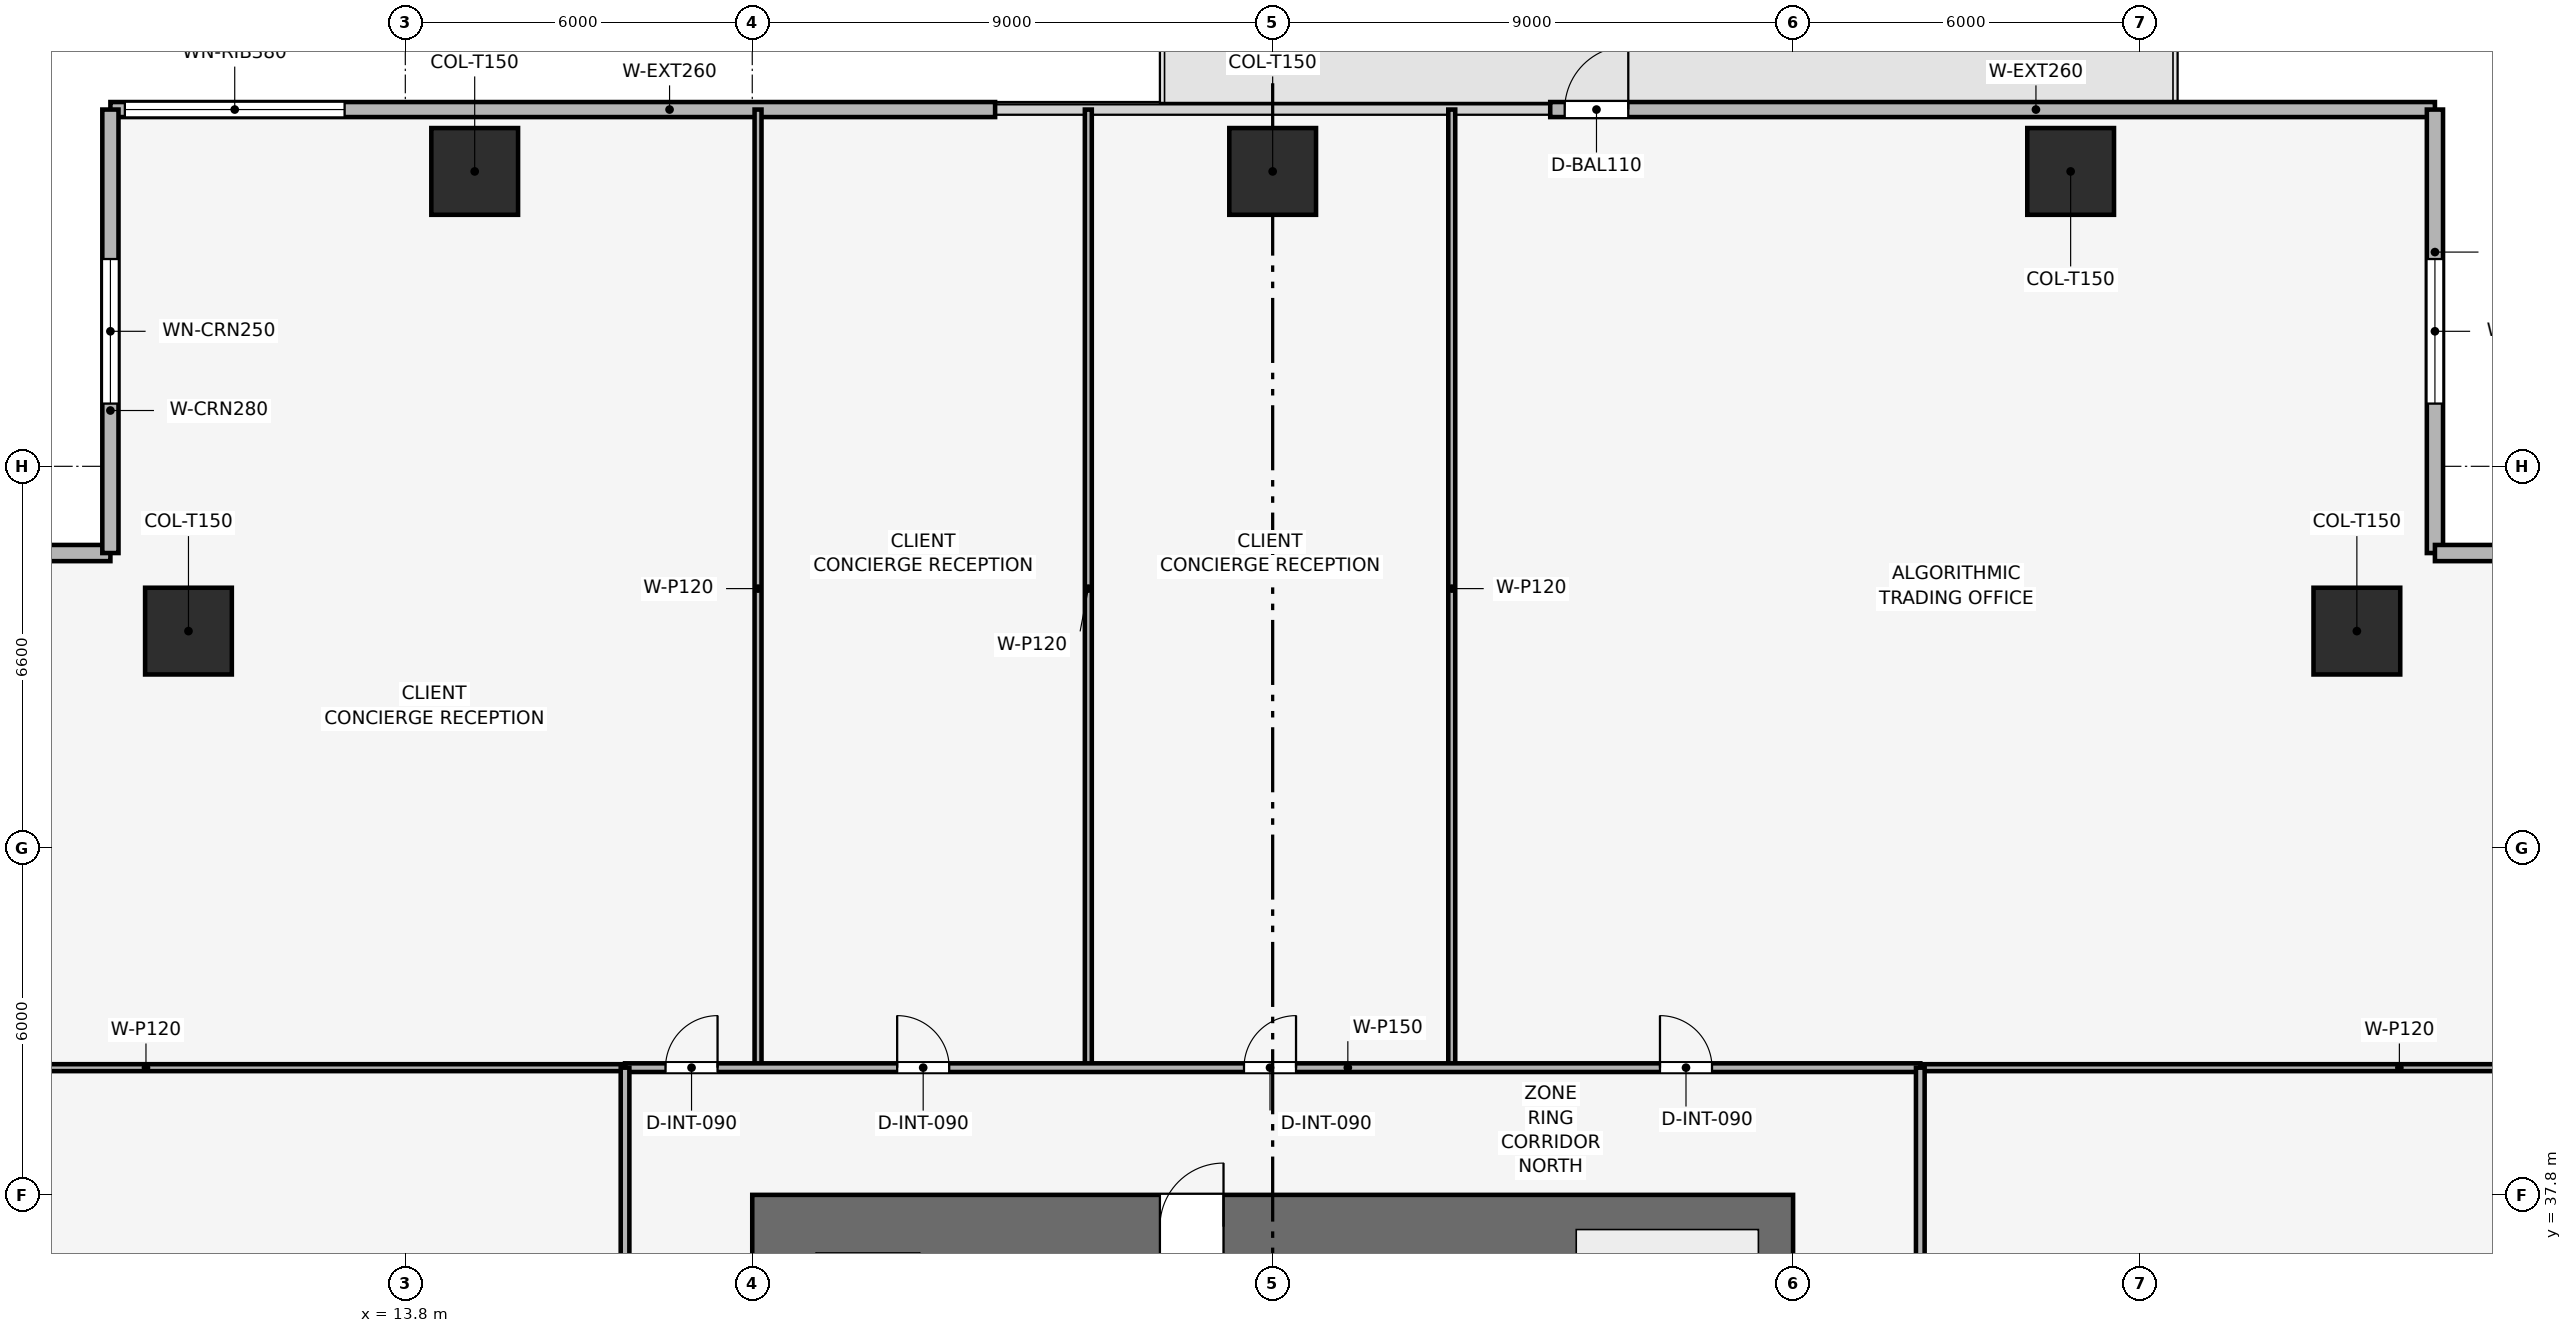
"""IFC4 building model, lengths in metres.
Left out: names, types, materials, properties, quantities, classifications, styles, units other than length and angle.
Written with IfcOpenShell. Run it as: python <this file> out.ifc"""

import sys

from ifc_helpers import new_model, si_unit, direction, frame, frame_2d, origin, origin_2d, place, context, subcontext, project, spatial, rectangle, extrude, element, fill, save


model = new_model("IFC4")
c1 = context("Model", 3, precision=1e-05, world=origin(), true_north=direction((0.0, 1.0)))
c2 = subcontext(c1, "Body", "Model", "MODEL_VIEW")
j1 = project(units=[si_unit("LENGTHUNIT", "METRE"), si_unit("PLANEANGLEUNIT", "RADIAN")], contexts=[c1])
p1 = place(None, origin())
s1 = spatial("IfcSite", under=j1, at=p1, CompositionType="ELEMENT")
p2 = place(p1, origin())
s2 = spatial("IfcBuilding", under=s1, at=p2, CompositionType="ELEMENT")
p3 = place(p2, frame((0.0, 0.0, 100.2)))
s3 = spatial("IfcBuildingStorey", under=s2, at=p3, CompositionType="ELEMENT", Elevation=100.2)
p4 = place(p3, frame((19.8, 37.25, 0.0), z_axis=(0.0, 0.0, 1.0), x_axis=(1.0, 0.0, 0.0)))
e1 = element("IfcWall", 1, at=p4, inside=s3, PredefinedType="SHEAR", context=c2, shape_type="SweptSolid", body=[
    extrude(rectangle(XDim=18.0, YDim=1.1, at=frame_2d((9.0, 0.0))), origin(), (0.0, 0.0, 1.0), 3.9),
])
p5 = place(p4, frame((7.05, 0.0, 0.0)))
e2 = element("IfcOpeningElement", 2, at=p5, cuts=e1, PredefinedType="OPENING", context=c2, shape_type="SweptSolid", body=[
    extrude(rectangle(XDim=1.1, YDim=2.15, at=frame_2d((0.55, 1.075))), frame((0.0, 0.56, 0.0), z_axis=(0.0, -1.0, 0.0), x_axis=(1.0, 0.0, 0.0)), (0.0, 0.0, 1.0), 1.12),
])
for number, where, z_axis, x_axis in (
    (3, (42.6, 55.5, 0.003), (0.0, 0.0, 1.0), (1.0, 0.0, 0.0)),
    (4, (28.8, 55.5, 0.003), (0.0, 0.0, 1.0), (1.0, 0.0, 0.0)),
    (5, (15.0, 55.5, 0.003), (0.0, 0.0, 1.0), (1.0, 0.0, 0.0)),
    (6, (47.55, 47.55, 0.003), (0.0, 0.0, 1.0), (1.0, 0.0, 0.0)),
    (7, (10.05, 47.55, 0.003), (0.0, 0.0, 1.0), (1.0, 0.0, 0.0)),
):
    element("IfcColumn", number, at=place(p3, frame(where, z_axis=z_axis, x_axis=x_axis)), inside=s3, PredefinedType="COLUMN", context=c2, shape_type="SweptSolid", body=[
        extrude(rectangle(XDim=1.5, YDim=1.5, at=origin_2d()), origin(), (0.0, 0.0, 1.0), 3.644),
    ])
p6 = place(p3, frame((8.7, 56.57, 0.0), z_axis=(0.0, 0.0, 1.0), x_axis=(1.0, 0.0, 0.0)))
e8 = element("IfcWall", 8, at=p6, inside=s3, PredefinedType="SOLIDWALL", context=c2, shape_type="SweptSolid", body=[
    extrude(rectangle(XDim=15.3, YDim=0.26, at=frame_2d((7.65, 0.0))), origin(), (0.0, 0.0, 1.0), 3.65),
])
p7 = place(p6, frame((0.25, 0.0, 0.9)))
e9 = element("IfcOpeningElement", 9, at=p7, cuts=e8, PredefinedType="OPENING", context=c2, shape_type="SweptSolid", body=[
    extrude(rectangle(XDim=3.8, YDim=1.9, at=frame_2d((1.9, 0.95))), frame((0.0, 0.14, 0.0), z_axis=(0.0, -1.0, 0.0), x_axis=(1.0, 0.0, 0.0)), (0.0, 0.0, 1.0), 0.28),
])
p8 = place(p3, frame((33.6, 56.57, 0.0), z_axis=(0.0, 0.0, 1.0), x_axis=(1.0, 0.0, 0.0)))
e10 = element("IfcWall", 10, at=p8, inside=s3, PredefinedType="SOLIDWALL", context=c2, shape_type="SweptSolid", body=[
    extrude(rectangle(XDim=15.3, YDim=0.26, at=frame_2d((7.65, 0.0))), origin(), (0.0, 0.0, 1.0), 3.65),
])
p9 = place(p8, frame((0.25, 0.0, 0.0)))
e11 = element("IfcOpeningElement", 11, at=p9, cuts=e10, PredefinedType="OPENING", context=c2, shape_type="SweptSolid", body=[
    extrude(rectangle(XDim=1.1, YDim=2.2, at=frame_2d((0.55, 1.1))), frame((0.0, 0.14, 0.0), z_axis=(0.0, -1.0, 0.0), x_axis=(1.0, 0.0, 0.0)), (0.0, 0.0, 1.0), 0.28),
])
p10 = place(p3, frame((1.03, 48.9, 0.0), z_axis=(0.0, 0.0, 1.0), x_axis=(1.0, 0.0, 0.0)))
e12 = element("IfcWall", 12, at=p10, inside=s3, PredefinedType="SOLIDWALL", context=c2, shape_type="SweptSolid", body=[
    extrude(rectangle(XDim=7.67, YDim=0.28, at=frame_2d((3.835, 0.0))), origin(), (0.0, 0.0, 1.0), 3.65),
])
p11 = place(p10, frame((2.585, 0.0, 0.9)))
e13 = element("IfcOpeningElement", 13, at=p11, cuts=e12, PredefinedType="OPENING", context=c2, shape_type="SweptSolid", body=[
    extrude(rectangle(XDim=2.5, YDim=1.9, at=frame_2d((1.25, 0.95))), frame((0.0, 0.15, 0.0), z_axis=(0.0, -1.0, 0.0), x_axis=(1.0, 0.0, 0.0)), (0.0, 0.0, 1.0), 0.3),
])
p12 = place(p3, frame((8.7, 48.9, 0.0), z_axis=(0.0, 0.0, 1.0), x_axis=(0.0, 1.0, 0.0)))
e14 = element("IfcWall", 14, at=p12, inside=s3, PredefinedType="SOLIDWALL", context=c2, shape_type="SweptSolid", body=[
    extrude(rectangle(XDim=7.67, YDim=0.28, at=frame_2d((3.835, 0.0))), origin(), (0.0, 0.0, 1.0), 3.65),
])
p13 = place(p12, frame((2.585, 0.0, 0.9)))
e15 = element("IfcOpeningElement", 15, at=p13, cuts=e14, PredefinedType="OPENING", context=c2, shape_type="SweptSolid", body=[
    extrude(rectangle(XDim=2.5, YDim=1.9, at=frame_2d((1.25, 0.95))), frame((0.0, 0.15, 0.0), z_axis=(0.0, -1.0, 0.0), x_axis=(1.0, 0.0, 0.0)), (0.0, 0.0, 1.0), 0.3),
])
p14 = place(p3, frame((48.9, 56.57, 0.0), z_axis=(0.0, 0.0, 1.0), x_axis=(0.0, -1.0, 0.0)))
e16 = element("IfcWall", 16, at=p14, inside=s3, PredefinedType="SOLIDWALL", context=c2, shape_type="SweptSolid", body=[
    extrude(rectangle(XDim=7.67, YDim=0.28, at=frame_2d((3.835, 0.0))), origin(), (0.0, 0.0, 1.0), 3.65),
])
p15 = place(p14, frame((2.585, 0.0, 0.9)))
e17 = element("IfcOpeningElement", 17, at=p15, cuts=e16, PredefinedType="OPENING", context=c2, shape_type="SweptSolid", body=[
    extrude(rectangle(XDim=2.5, YDim=1.9, at=frame_2d((1.25, 0.95))), frame((0.0, 0.15, 0.0), z_axis=(0.0, -1.0, 0.0), x_axis=(1.0, 0.0, 0.0)), (0.0, 0.0, 1.0), 0.3),
])
p16 = place(p3, frame((48.9, 48.9, 0.0), z_axis=(0.0, 0.0, 1.0), x_axis=(1.0, 0.0, 0.0)))
e18 = element("IfcWall", 18, at=p16, inside=s3, PredefinedType="SOLIDWALL", context=c2, shape_type="SweptSolid", body=[
    extrude(rectangle(XDim=7.67, YDim=0.28, at=frame_2d((3.835, 0.0))), origin(), (0.0, 0.0, 1.0), 3.65),
])
p17 = place(p16, frame((2.585, 0.0, 0.9)))
e19 = element("IfcOpeningElement", 19, at=p17, cuts=e18, PredefinedType="OPENING", context=c2, shape_type="SweptSolid", body=[
    extrude(rectangle(XDim=2.5, YDim=1.9, at=frame_2d((1.25, 0.95))), frame((0.0, 0.15, 0.0), z_axis=(0.0, -1.0, 0.0), x_axis=(1.0, 0.0, 0.0)), (0.0, 0.0, 1.0), 0.3),
])
for number, where, z_axis, x_axis in (
    (20, (19.9, 40.0, 0.0), (0.0, 0.0, 1.0), (0.0, 1.0, 0.0)),
    (21, (25.612, 40.0, 0.0), (0.0, 0.0, 1.0), (0.0, 1.0, 0.0)),
    (22, (31.897, 40.0, 0.0), (0.0, 0.0, 1.0), (0.0, 1.0, 0.0)),
    (23, (1.03, 40.0, 0.0), (0.0, 0.0, 1.0), (1.0, 0.0, 0.0)),
    (24, (40.0, 40.0, 0.0), (0.0, 0.0, 1.0), (1.0, 0.0, 0.0)),
):
    element("IfcWall", number, at=place(p3, frame(where, z_axis=z_axis, x_axis=x_axis)), inside=s3, PredefinedType="PARTITIONING", context=c2, shape_type="SweptSolid", body=[
        extrude(rectangle(XDim=16.57, YDim=0.12, at=frame_2d((8.285, 0.0))), origin(), (0.0, 0.0, 1.0), 2.935),
    ])
p18 = place(p3, frame((17.6, 40.0, 0.0), z_axis=(0.0, 0.0, 1.0), x_axis=(1.0, 0.0, 0.0)))
e25 = element("IfcWall", 25, at=p18, inside=s3, PredefinedType="PARTITIONING", context=c2, shape_type="SweptSolid", body=[
    extrude(rectangle(XDim=22.4, YDim=0.15, at=frame_2d((11.2, 0.0))), origin(), (0.0, 0.0, 1.0), 3.085),
])
p19 = place(p18, frame((0.7, 0.0, 0.0)))
e26 = element("IfcOpeningElement", 26, at=p19, cuts=e25, PredefinedType="OPENING", context=c2, shape_type="SweptSolid", body=[
    extrude(rectangle(XDim=0.9, YDim=2.1, at=frame_2d((0.45, 1.05))), frame((0.0, 0.085, 0.0), z_axis=(0.0, -1.0, 0.0), x_axis=(1.0, 0.0, 0.0)), (0.0, 0.0, 1.0), 0.17),
])
p20 = place(p18, frame((4.706, 0.0, 0.0)))
e27 = element("IfcOpeningElement", 27, at=p20, cuts=e25, PredefinedType="OPENING", context=c2, shape_type="SweptSolid", body=[
    extrude(rectangle(XDim=0.9, YDim=2.1, at=frame_2d((0.45, 1.05))), frame((0.0, 0.085, 0.0), z_axis=(0.0, -1.0, 0.0), x_axis=(1.0, 0.0, 0.0)), (0.0, 0.0, 1.0), 0.17),
])
p21 = place(p18, frame((10.704, 0.0, 0.0)))
e28 = element("IfcOpeningElement", 28, at=p21, cuts=e25, PredefinedType="OPENING", context=c2, shape_type="SweptSolid", body=[
    extrude(rectangle(XDim=0.9, YDim=2.1, at=frame_2d((0.45, 1.05))), frame((0.0, 0.085, 0.0), z_axis=(0.0, -1.0, 0.0), x_axis=(1.0, 0.0, 0.0)), (0.0, 0.0, 1.0), 0.17),
])
p22 = place(p18, frame((17.898, 0.0, 0.0)))
e29 = element("IfcOpeningElement", 29, at=p22, cuts=e25, PredefinedType="OPENING", context=c2, shape_type="SweptSolid", body=[
    extrude(rectangle(XDim=0.9, YDim=2.1, at=frame_2d((0.45, 1.05))), frame((0.0, 0.085, 0.0), z_axis=(0.0, -1.0, 0.0), x_axis=(1.0, 0.0, 0.0)), (0.0, 0.0, 1.0), 0.17),
])
p23 = place(p3, frame((17.6, 17.6, 0.0), z_axis=(0.0, 0.0, 1.0), x_axis=(0.0, 1.0, 0.0)))
e30 = element("IfcWall", 30, at=p23, inside=s3, PredefinedType="PARTITIONING", context=c2, shape_type="SweptSolid", body=[
    extrude(rectangle(XDim=22.4, YDim=0.15, at=frame_2d((11.2, 0.0))), origin(), (0.0, 0.0, 1.0), 3.085),
])
p24 = place(p23, frame((0.778, 0.0, 0.0)))
e31 = element("IfcOpeningElement", 31, at=p24, cuts=e30, PredefinedType="OPENING", context=c2, shape_type="SweptSolid", body=[
    extrude(rectangle(XDim=0.9, YDim=2.1, at=frame_2d((0.45, 1.05))), frame((0.0, 0.085, 0.0), z_axis=(0.0, -1.0, 0.0), x_axis=(1.0, 0.0, 0.0)), (0.0, 0.0, 1.0), 0.17),
])
p25 = place(p23, frame((6.372, 0.0, 0.0)))
e32 = element("IfcOpeningElement", 32, at=p25, cuts=e30, PredefinedType="OPENING", context=c2, shape_type="SweptSolid", body=[
    extrude(rectangle(XDim=0.9, YDim=2.1, at=frame_2d((0.45, 1.05))), frame((0.0, 0.085, 0.0), z_axis=(0.0, -1.0, 0.0), x_axis=(1.0, 0.0, 0.0)), (0.0, 0.0, 1.0), 0.17),
])
p26 = place(p23, frame((16.343, 0.0, 0.0)))
e33 = element("IfcOpeningElement", 33, at=p26, cuts=e30, PredefinedType="OPENING", context=c2, shape_type="SweptSolid", body=[
    extrude(rectangle(XDim=0.9, YDim=2.1, at=frame_2d((0.45, 1.05))), frame((0.0, 0.085, 0.0), z_axis=(0.0, -1.0, 0.0), x_axis=(1.0, 0.0, 0.0)), (0.0, 0.0, 1.0), 0.17),
])
p27 = place(p3, frame((40.0, 17.6, 0.0), z_axis=(0.0, 0.0, 1.0), x_axis=(0.0, 1.0, 0.0)))
e34 = element("IfcWall", 34, at=p27, inside=s3, PredefinedType="PARTITIONING", context=c2, shape_type="SweptSolid", body=[
    extrude(rectangle(XDim=22.4, YDim=0.15, at=frame_2d((11.2, 0.0))), origin(), (0.0, 0.0, 1.0), 3.085),
])
p28 = place(p27, frame((1.4, 0.0, 0.0)))
e35 = element("IfcOpeningElement", 35, at=p28, cuts=e34, PredefinedType="OPENING", context=c2, shape_type="SweptSolid", body=[
    extrude(rectangle(XDim=0.9, YDim=2.1, at=frame_2d((0.45, 1.05))), frame((0.0, 0.085, 0.0), z_axis=(0.0, -1.0, 0.0), x_axis=(1.0, 0.0, 0.0)), (0.0, 0.0, 1.0), 0.17),
])
p29 = place(p27, frame((4.65, 0.0, 0.0)))
e36 = element("IfcOpeningElement", 36, at=p29, cuts=e34, PredefinedType="OPENING", context=c2, shape_type="SweptSolid", body=[
    extrude(rectangle(XDim=0.9, YDim=2.1, at=frame_2d((0.45, 1.05))), frame((0.0, 0.085, 0.0), z_axis=(0.0, -1.0, 0.0), x_axis=(1.0, 0.0, 0.0)), (0.0, 0.0, 1.0), 0.17),
])
p30 = place(p27, frame((7.55, 0.0, 0.0)))
e37 = element("IfcOpeningElement", 37, at=p30, cuts=e34, PredefinedType="OPENING", context=c2, shape_type="SweptSolid", body=[
    extrude(rectangle(XDim=0.9, YDim=2.1, at=frame_2d((0.45, 1.05))), frame((0.0, 0.085, 0.0), z_axis=(0.0, -1.0, 0.0), x_axis=(1.0, 0.0, 0.0)), (0.0, 0.0, 1.0), 0.17),
])
p31 = place(p27, frame((10.3, 0.0, 0.0)))
e38 = element("IfcOpeningElement", 38, at=p31, cuts=e34, PredefinedType="OPENING", context=c2, shape_type="SweptSolid", body=[
    extrude(rectangle(XDim=0.95, YDim=2.1, at=frame_2d((0.475, 1.05))), frame((0.0, 0.085, 0.0), z_axis=(0.0, -1.0, 0.0), x_axis=(1.0, 0.0, 0.0)), (0.0, 0.0, 1.0), 0.17),
])
p32 = place(p27, frame((16.8, 0.0, 0.0)))
e39 = element("IfcOpeningElement", 39, at=p32, cuts=e34, PredefinedType="OPENING", context=c2, shape_type="SweptSolid", body=[
    extrude(rectangle(XDim=0.9, YDim=2.1, at=frame_2d((0.45, 1.05))), frame((0.0, 0.085, 0.0), z_axis=(0.0, -1.0, 0.0), x_axis=(1.0, 0.0, 0.0)), (0.0, 0.0, 1.0), 0.17),
])
p33 = place(p9, origin())
e40 = element("IfcDoor", 40, at=p33, inside=s3, OperationType="SINGLE_SWING_RIGHT", PredefinedType="DOOR", context=c2, shape_type="SweptSolid", body=[
    extrude(rectangle(XDim=1.1, YDim=2.2, at=frame_2d((0.55, 1.1))), frame((0.0, 0.025, 0.0), z_axis=(0.0, -1.0, 0.0), x_axis=(1.0, 0.0, 0.0)), (0.0, 0.0, 1.0), 0.05),
])
fill(e11, e40)
p34 = place(p7, origin())
e41 = element("IfcWindow", 41, at=p34, inside=s3, PartitioningType="SINGLE_PANEL", PredefinedType="WINDOW", context=c2, shape_type="SweptSolid", body=[
    extrude(rectangle(XDim=3.8, YDim=1.9, at=frame_2d((1.9, 0.95))), frame((0.0, 0.03, 0.0), z_axis=(0.0, -1.0, 0.0), x_axis=(1.0, 0.0, 0.0)), (0.0, 0.0, 1.0), 0.06),
])
fill(e9, e41)
p35 = place(p13, origin())
e42 = element("IfcWindow", 42, at=p35, inside=s3, PartitioningType="SINGLE_PANEL", PredefinedType="WINDOW", context=c2, shape_type="SweptSolid", body=[
    extrude(rectangle(XDim=2.5, YDim=1.9, at=frame_2d((1.25, 0.95))), frame((0.0, 0.03, 0.0), z_axis=(0.0, -1.0, 0.0), x_axis=(1.0, 0.0, 0.0)), (0.0, 0.0, 1.0), 0.06),
])
fill(e15, e42)
p36 = place(p15, origin())
e43 = element("IfcWindow", 43, at=p36, inside=s3, PartitioningType="SINGLE_PANEL", PredefinedType="WINDOW", context=c2, shape_type="SweptSolid", body=[
    extrude(rectangle(XDim=2.5, YDim=1.9, at=frame_2d((1.25, 0.95))), frame((0.0, 0.03, 0.0), z_axis=(0.0, -1.0, 0.0), x_axis=(1.0, 0.0, 0.0)), (0.0, 0.0, 1.0), 0.06),
])
fill(e17, e43)
p37 = place(p19, origin())
e44 = element("IfcDoor", 44, at=p37, inside=s3, OperationType="SINGLE_SWING_RIGHT", PredefinedType="DOOR", context=c2, shape_type="SweptSolid", body=[
    extrude(rectangle(XDim=0.9, YDim=2.1, at=frame_2d((0.45, 1.05))), frame((0.0, 0.025, 0.0), z_axis=(0.0, -1.0, 0.0), x_axis=(1.0, 0.0, 0.0)), (0.0, 0.0, 1.0), 0.05),
])
fill(e26, e44)
p38 = place(p20, origin())
e45 = element("IfcDoor", 45, at=p38, inside=s3, OperationType="SINGLE_SWING_LEFT", PredefinedType="DOOR", context=c2, shape_type="SweptSolid", body=[
    extrude(rectangle(XDim=0.9, YDim=2.1, at=frame_2d((0.45, 1.05))), frame((0.0, 0.025, 0.0), z_axis=(0.0, -1.0, 0.0), x_axis=(1.0, 0.0, 0.0)), (0.0, 0.0, 1.0), 0.05),
])
fill(e27, e45)
p39 = place(p21, origin())
e46 = element("IfcDoor", 46, at=p39, inside=s3, OperationType="SINGLE_SWING_RIGHT", PredefinedType="DOOR", context=c2, shape_type="SweptSolid", body=[
    extrude(rectangle(XDim=0.9, YDim=2.1, at=frame_2d((0.45, 1.05))), frame((0.0, 0.025, 0.0), z_axis=(0.0, -1.0, 0.0), x_axis=(1.0, 0.0, 0.0)), (0.0, 0.0, 1.0), 0.05),
])
fill(e28, e46)
p40 = place(p22, origin())
e47 = element("IfcDoor", 47, at=p40, inside=s3, OperationType="SINGLE_SWING_LEFT", PredefinedType="DOOR", context=c2, shape_type="SweptSolid", body=[
    extrude(rectangle(XDim=0.9, YDim=2.1, at=frame_2d((0.45, 1.05))), frame((0.0, 0.025, 0.0), z_axis=(0.0, -1.0, 0.0), x_axis=(1.0, 0.0, 0.0)), (0.0, 0.0, 1.0), 0.05),
])
fill(e29, e47)
p41 = place(p5, origin())
e48 = element("IfcDoor", 48, at=p41, inside=s3, OperationType="SINGLE_SWING_RIGHT", PredefinedType="DOOR", context=c2, shape_type="SweptSolid", body=[
    extrude(rectangle(XDim=1.1, YDim=2.15, at=frame_2d((0.55, 1.075))), frame((0.0, 0.025, 0.0), z_axis=(0.0, -1.0, 0.0), x_axis=(1.0, 0.0, 0.0)), (0.0, 0.0, 1.0), 0.05),
])
fill(e2, e48)
save(model, sys.argv[1])
